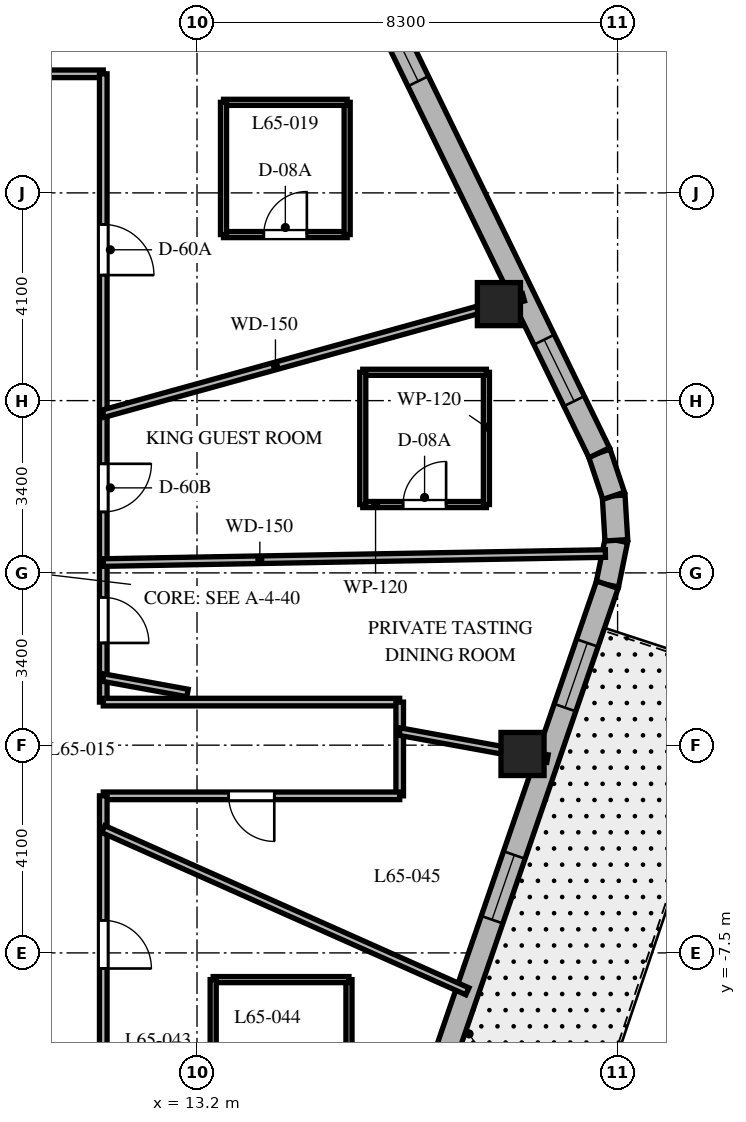
"""IFC4 building model, lengths in metres.
Left out: names, types, materials, properties, quantities, classifications, styles, units other than length and angle.
Written with IfcOpenShell. Run it as: python <this file> out.ifc"""

import sys

from ifc_helpers import new_model, si_unit, direction, frame, frame_2d, origin, origin_2d, place, context, subcontext, project, spatial, rectangle, extrude, element, fill, save


model = new_model("IFC4")
c1 = context("Model", 3, precision=1e-05, world=origin(), true_north=direction((0.0, 1.0)))
c2 = subcontext(c1, "Body", "Model", "MODEL_VIEW")
j1 = project(units=[si_unit("LENGTHUNIT", "METRE"), si_unit("PLANEANGLEUNIT", "RADIAN")], contexts=[c1])
p1 = place(None, origin())
s1 = spatial("IfcSite", under=j1, at=p1, CompositionType="ELEMENT")
p2 = place(p1, origin())
s2 = spatial("IfcBuilding", under=s1, at=p2, CompositionType="ELEMENT")
p3 = place(p2, frame((0.0, 0.0, 261.3)))
s3 = spatial("IfcBuildingStorey", under=s2, at=p3, CompositionType="ELEMENT", Elevation=261.3)
for number, where, z_axis, x_axis in (
    (1, (19.624, -3.574, 0.0), (0.0, 0.0, 1.0), (1.0, 0.0, 0.0)),
    (2, (19.158, 5.305, 0.0), (0.0, 0.0, 1.0), (1.0, 0.0, 0.0)),
):
    element("IfcColumn", number, at=place(p3, frame(where, z_axis=z_axis, x_axis=x_axis)), inside=s3, PredefinedType="COLUMN", context=c2, shape_type="SweptSolid", body=[
        extrude(rectangle(XDim=0.85, YDim=0.85, at=origin_2d()), origin(), (0.0, 0.0, 1.0), 3.9),
    ])
p4 = place(p3, frame((21.298, -0.233, 0.0), z_axis=(0.0, 0.0, 1.0), x_axis=(0.199158176661, 0.979967356941, 0.0)))
e3 = element("IfcWall", 3, at=p4, inside=s3, PredefinedType="SOLIDWALL", context=c2, shape_type="SweptSolid", body=[
    extrude(rectangle(XDim=0.895, YDim=0.45, at=frame_2d((0.447, 0.0))), origin(), (0.0, 0.0, 1.0), 3.6),
])
p5 = place(p3, frame((21.476, 0.644, 0.0), z_axis=(0.0, 0.0, 1.0), x_axis=(-0.061031097918, 0.998135865044, 0.0)))
e4 = element("IfcWall", 4, at=p5, inside=s3, PredefinedType="SOLIDWALL", context=c2, shape_type="SweptSolid", body=[
    extrude(rectangle(XDim=0.88, YDim=0.45, at=frame_2d((0.44, 0.0))), origin(), (0.0, 0.0, 1.0), 3.6),
])
p6 = place(p3, frame((21.422, 1.522, 0.0), z_axis=(0.0, 0.0, 1.0), x_axis=(-0.316964162323, 0.94843751497, 0.0)))
e5 = element("IfcWall", 5, at=p6, inside=s3, PredefinedType="SOLIDWALL", context=c2, shape_type="SweptSolid", body=[
    extrude(rectangle(XDim=0.895, YDim=0.45, at=frame_2d((0.448, 0.0))), origin(), (0.0, 0.0, 1.0), 3.6),
])
p7 = place(p3, frame((15.26, -17.776, 0.0), z_axis=(0.0, 0.0, 1.0), x_axis=(0.325407437101, 0.945573899745, 0.0)))
e6 = element("IfcWall", 6, at=p7, inside=s3, PredefinedType="SOLIDWALL", context=c2, shape_type="SweptSolid", body=[
    extrude(rectangle(XDim=18.552, YDim=0.45, at=frame_2d((9.276, 0.0))), origin(), (0.0, 0.0, 1.0), 3.6),
])
p8 = place(p7, frame((4.602, 0.0, 0.0)))
e7 = element("IfcOpeningElement", 7, at=p8, cuts=e6, PredefinedType="OPENING", context=c2, shape_type="SweptSolid", body=[
    extrude(rectangle(XDim=0.95, YDim=2.15, at=frame_2d((0.475, 1.075))), frame((0.0, 0.235, 0.0), z_axis=(0.0, -1.0, 0.0), x_axis=(1.0, 0.0, 0.0)), (0.0, 0.0, 1.0), 0.47),
])
p9 = place(p7, frame((1.161, 0.0, 0.8)))
e8 = element("IfcOpeningElement", 8, at=p9, cuts=e6, PredefinedType="OPENING", context=c2, shape_type="SweptSolid", body=[
    extrude(rectangle(XDim=1.35, YDim=1.75, at=frame_2d((0.675, 0.875))), frame((0.0, 0.235, 0.0), z_axis=(0.0, -1.0, 0.0), x_axis=(1.0, 0.0, 0.0)), (0.0, 0.0, 1.0), 0.47),
])
p10 = place(p7, frame((6.379, 0.0, 0.8)))
e9 = element("IfcOpeningElement", 9, at=p10, cuts=e6, PredefinedType="OPENING", context=c2, shape_type="SweptSolid", body=[
    extrude(rectangle(XDim=1.35, YDim=1.75, at=frame_2d((0.675, 0.875))), frame((0.0, 0.235, 0.0), z_axis=(0.0, -1.0, 0.0), x_axis=(1.0, 0.0, 0.0)), (0.0, 0.0, 1.0), 0.47),
])
p11 = place(p7, frame((11.561, 0.0, 0.8)))
e10 = element("IfcOpeningElement", 10, at=p11, cuts=e6, PredefinedType="OPENING", context=c2, shape_type="SweptSolid", body=[
    extrude(rectangle(XDim=1.35, YDim=1.75, at=frame_2d((0.675, 0.875))), frame((0.0, 0.235, 0.0), z_axis=(0.0, -1.0, 0.0), x_axis=(1.0, 0.0, 0.0)), (0.0, 0.0, 1.0), 0.47),
])
p12 = place(p7, frame((15.987, 0.0, 0.8)))
e11 = element("IfcOpeningElement", 11, at=p12, cuts=e6, PredefinedType="OPENING", context=c2, shape_type="SweptSolid", body=[
    extrude(rectangle(XDim=1.35, YDim=1.75, at=frame_2d((0.675, 0.875))), frame((0.0, 0.235, 0.0), z_axis=(0.0, -1.0, 0.0), x_axis=(1.0, 0.0, 0.0)), (0.0, 0.0, 1.0), 0.47),
])
p13 = place(p3, frame((21.138, 2.371, 0.0), z_axis=(0.0, 0.0, 1.0), x_axis=(-0.438128124058, 0.89891253574, 0.0)))
e12 = element("IfcWall", 12, at=p13, inside=s3, PredefinedType="SOLIDWALL", context=c2, shape_type="SweptSolid", body=[
    extrude(rectangle(XDim=17.565, YDim=0.45, at=frame_2d((8.782, 0.0))), origin(), (0.0, 0.0, 1.0), 3.6),
])
p14 = place(p13, frame((1.133, 0.0, 0.8)))
e13 = element("IfcOpeningElement", 13, at=p14, cuts=e12, PredefinedType="OPENING", context=c2, shape_type="SweptSolid", body=[
    extrude(rectangle(XDim=1.35, YDim=1.75, at=frame_2d((0.675, 0.875))), frame((0.0, 0.235, 0.0), z_axis=(0.0, -1.0, 0.0), x_axis=(1.0, 0.0, 0.0)), (0.0, 0.0, 1.0), 0.47),
])
p15 = place(p13, frame((8.158, 0.0, 0.8)))
e14 = element("IfcOpeningElement", 14, at=p15, cuts=e12, PredefinedType="OPENING", context=c2, shape_type="SweptSolid", body=[
    extrude(rectangle(XDim=1.35, YDim=1.75, at=frame_2d((0.675, 0.875))), frame((0.0, 0.235, 0.0), z_axis=(0.0, -1.0, 0.0), x_axis=(1.0, 0.0, 0.0)), (0.0, 0.0, 1.0), 0.47),
])
p16 = place(p13, frame((15.132, 0.0, 0.8)))
e15 = element("IfcOpeningElement", 15, at=p16, cuts=e12, PredefinedType="OPENING", context=c2, shape_type="SweptSolid", body=[
    extrude(rectangle(XDim=1.35, YDim=1.75, at=frame_2d((0.675, 0.875))), frame((0.0, 0.235, 0.0), z_axis=(0.0, -1.0, 0.0), x_axis=(1.0, 0.0, 0.0)), (0.0, 0.0, 1.0), 0.47),
])
p17 = place(p3, frame((0.92, 9.85, 0.0), z_axis=(0.0, 0.0, 1.0), x_axis=(1.0, 0.0, 0.0)))
e16 = element("IfcWall", 16, at=p17, inside=s3, PredefinedType="PARTITIONING", context=c2, shape_type="SweptSolid", body=[
    extrude(rectangle(XDim=10.43, YDim=0.15, at=frame_2d((5.215, 0.0))), origin(), (0.0, 0.0, 1.0), 3.09),
])
p18 = place(p17, frame((2.86, 0.0, 0.0)))
e17 = element("IfcOpeningElement", 17, at=p18, cuts=e16, PredefinedType="OPENING", context=c2, shape_type="SweptSolid", body=[
    extrude(rectangle(XDim=0.9, YDim=2.03, at=frame_2d((0.45, 1.015))), frame((0.0, 0.085, 0.0), z_axis=(0.0, -1.0, 0.0), x_axis=(1.0, 0.0, 0.0)), (0.0, 0.0, 1.0), 0.17),
])
p19 = place(p3, frame((11.35, 9.85, 0.0), z_axis=(0.0, 0.0, 1.0), x_axis=(0.0, -1.0, 0.0)))
e18 = element("IfcWall", 18, at=p19, inside=s3, PredefinedType="PARTITIONING", context=c2, shape_type="SweptSolid", body=[
    extrude(rectangle(XDim=12.4, YDim=0.15, at=frame_2d((6.2, 0.0))), origin(), (0.0, 0.0, 1.0), 3.09),
])
p20 = place(p19, frame((7.697, 0.0, 0.0)))
e19 = element("IfcOpeningElement", 19, at=p20, cuts=e18, PredefinedType="OPENING", context=c2, shape_type="SweptSolid", body=[
    extrude(rectangle(XDim=0.95, YDim=2.03, at=frame_2d((0.475, 1.015))), frame((0.0, 0.085, 0.0), z_axis=(0.0, -1.0, 0.0), x_axis=(1.0, 0.0, 0.0)), (0.0, 0.0, 1.0), 0.17),
])
p21 = place(p19, frame((2.973, 0.0, 0.0)))
e20 = element("IfcOpeningElement", 20, at=p21, cuts=e18, PredefinedType="OPENING", context=c2, shape_type="SweptSolid", body=[
    extrude(rectangle(XDim=1.0, YDim=2.03, at=frame_2d((0.5, 1.015))), frame((0.0, 0.085, 0.0), z_axis=(0.0, -1.0, 0.0), x_axis=(1.0, 0.0, 0.0)), (0.0, 0.0, 1.0), 0.17),
])
p22 = place(p19, frame((10.333, 0.0, 0.0)))
e21 = element("IfcOpeningElement", 21, at=p22, cuts=e18, PredefinedType="OPENING", context=c2, shape_type="SweptSolid", body=[
    extrude(rectangle(XDim=0.9, YDim=2.03, at=frame_2d((0.45, 1.015))), frame((0.0, 0.085, 0.0), z_axis=(0.0, -1.0, 0.0), x_axis=(1.0, 0.0, 0.0)), (0.0, 0.0, 1.0), 0.17),
])
p23 = place(p3, frame((11.35, -2.55, 0.0), z_axis=(0.0, 0.0, 1.0), x_axis=(1.0, 0.0, 0.0)))
e22 = element("IfcWall", 22, at=p23, inside=s3, PredefinedType="PARTITIONING", context=c2, shape_type="SweptSolid", body=[
    extrude(rectangle(XDim=5.85, YDim=0.15, at=frame_2d((2.925, 0.0))), origin(), (0.0, 0.0, 1.0), 3.041),
])
p24 = place(p3, frame((17.2, -2.55, 0.0), z_axis=(0.0, 0.0, 1.0), x_axis=(0.0, -1.0, 0.0)))
e23 = element("IfcWall", 23, at=p24, inside=s3, PredefinedType="PARTITIONING", context=c2, shape_type="SweptSolid", body=[
    extrude(rectangle(XDim=1.85, YDim=0.15, at=frame_2d((0.925, 0.0))), origin(), (0.0, 0.0, 1.0), 3.09),
])
p25 = place(p3, frame((17.2, -4.4, 0.0), z_axis=(0.0, 0.0, 1.0), x_axis=(-1.0, 0.0, 0.0)))
e24 = element("IfcWall", 24, at=p25, inside=s3, PredefinedType="PARTITIONING", context=c2, shape_type="SweptSolid", body=[
    extrude(rectangle(XDim=5.85, YDim=0.15, at=frame_2d((2.925, 0.0))), origin(), (0.0, 0.0, 1.0), 3.041),
])
p26 = place(p25, frame((2.475, 0.0, 0.0)))
e25 = element("IfcOpeningElement", 25, at=p26, cuts=e24, PredefinedType="OPENING", context=c2, shape_type="SweptSolid", body=[
    extrude(rectangle(XDim=0.9, YDim=2.03, at=frame_2d((0.45, 1.015))), frame((0.0, 0.085, 0.0), z_axis=(0.0, -1.0, 0.0), x_axis=(1.0, 0.0, 0.0)), (0.0, 0.0, 1.0), 0.17),
])
p27 = place(p3, frame((11.35, -4.4, 0.0), z_axis=(0.0, 0.0, 1.0), x_axis=(0.0, -1.0, 0.0)))
e26 = element("IfcWall", 26, at=p27, inside=s3, PredefinedType="PARTITIONING", context=c2, shape_type="SweptSolid", body=[
    extrude(rectangle(XDim=5.45, YDim=0.15, at=frame_2d((2.725, 0.0))), origin(), (0.0, 0.0, 1.0), 3.09),
])
p28 = place(p27, frame((2.458, 0.0, 0.0)))
e27 = element("IfcOpeningElement", 27, at=p28, cuts=e26, PredefinedType="OPENING", context=c2, shape_type="SweptSolid", body=[
    extrude(rectangle(XDim=0.95, YDim=2.03, at=frame_2d((0.475, 1.015))), frame((0.0, 0.085, 0.0), z_axis=(0.0, -1.0, 0.0), x_axis=(1.0, 0.0, 0.0)), (0.0, 0.0, 1.0), 0.17),
])
p29 = place(p3, frame((11.35, 0.204, 0.0), z_axis=(0.0, 0.0, 1.0), x_axis=(0.999838748671, 0.017957635019, 0.0)))
e28 = element("IfcWall", 28, at=p29, inside=s3, PredefinedType="PARTITIONING", context=c2, shape_type="SweptSolid", body=[
    extrude(rectangle(XDim=9.911, YDim=0.15, at=frame_2d((4.956, 0.0))), origin(), (0.0, 0.0, 1.0), 2.94),
])
p30 = place(p3, frame((11.35, 3.143, 0.0), z_axis=(0.0, 0.0, 1.0), x_axis=(0.963731818141, 0.266872596386, 0.0)))
e29 = element("IfcWall", 29, at=p30, inside=s3, PredefinedType="PARTITIONING", context=c2, shape_type="SweptSolid", body=[
    extrude(rectangle(XDim=8.605, YDim=0.15, at=frame_2d((4.302, 0.0))), origin(), (0.0, 0.0, 1.0), 2.94),
])
p31 = place(p3, frame((9.672, 9.85, 0.0), z_axis=(0.0, 0.0, 1.0), x_axis=(0.700629771301, 0.713524998558, 0.0)))
e30 = element("IfcWall", 30, at=p31, inside=s3, PredefinedType="PARTITIONING", context=c2, shape_type="SweptSolid", body=[
    extrude(rectangle(XDim=7.459, YDim=0.15, at=frame_2d((3.73, 0.0))), origin(), (0.0, 0.0, 1.0), 2.94),
])
p32 = place(p31, frame((3.28, 0.0, 0.0)))
e31 = element("IfcOpeningElement", 31, at=p32, cuts=e30, PredefinedType="OPENING", context=c2, shape_type="SweptSolid", body=[
    extrude(rectangle(XDim=0.9, YDim=2.03, at=frame_2d((0.45, 1.015))), frame((0.0, 0.085, 0.0), z_axis=(0.0, -1.0, 0.0), x_axis=(1.0, 0.0, 0.0)), (0.0, 0.0, 1.0), 0.17),
])
p33 = place(p3, frame((5.454, 9.85, 0.0), z_axis=(0.0, 0.0, 1.0), x_axis=(0.48439420613, 0.874849846012, 0.0)))
e32 = element("IfcWall", 32, at=p33, inside=s3, PredefinedType="PARTITIONING", context=c2, shape_type="SweptSolid", body=[
    extrude(rectangle(XDim=11.375, YDim=0.15, at=frame_2d((5.688, 0.0))), origin(), (0.0, 0.0, 1.0), 2.94),
])
p34 = place(p3, frame((11.35, -5.057, 0.0), z_axis=(0.0, 0.0, 1.0), x_axis=(0.91344644156, -0.406958964026, 0.0)))
e33 = element("IfcWall", 33, at=p34, inside=s3, PredefinedType="PARTITIONING", context=c2, shape_type="SweptSolid", body=[
    extrude(rectangle(XDim=7.867, YDim=0.15, at=frame_2d((3.933, 0.0))), origin(), (0.0, 0.0, 1.0), 2.94),
])
p35 = place(p3, frame((11.35, -2.067, 0.0), z_axis=(0.0, 0.0, 1.0), x_axis=(0.983807459651, -0.179228575665, 0.0)))
e34 = element("IfcWall", 34, at=p35, inside=s3, PredefinedType="PARTITIONING", context=c2, shape_type="SweptSolid", body=[
    extrude(rectangle(XDim=1.69, YDim=0.15, at=frame_2d((0.845, 0.0))), origin(), (0.0, 0.0, 1.0), 3.6),
])
p36 = place(p3, frame((17.2, -3.133, 0.0), z_axis=(0.0, 0.0, 1.0), x_axis=(0.983817168797, -0.179175272791, 0.0)))
e35 = element("IfcWall", 35, at=p36, inside=s3, PredefinedType="PARTITIONING", context=c2, shape_type="SweptSolid", body=[
    extrude(rectangle(XDim=2.965, YDim=0.15, at=frame_2d((1.482, 0.0))), origin(), (0.0, 0.0, 1.0), 2.94),
])
p37 = place(p3, frame((16.471, 1.349, 0.0), z_axis=(0.0, 0.0, 1.0), x_axis=(1.0, 0.0, 0.0)))
e36 = element("IfcWall", 36, at=p37, inside=s3, PredefinedType="PARTITIONING", context=c2, shape_type="SweptSolid", body=[
    extrude(rectangle(XDim=2.44, YDim=0.12, at=frame_2d((1.22, 0.0))), origin(), (0.0, 0.0, 1.0), 3.6),
])
p38 = place(p37, frame((0.795, 0.0, 0.0)))
e37 = element("IfcOpeningElement", 37, at=p38, cuts=e36, PredefinedType="OPENING", context=c2, shape_type="SweptSolid", body=[
    extrude(rectangle(XDim=0.85, YDim=2.03, at=frame_2d((0.425, 1.015))), frame((0.0, 0.07, 0.0), z_axis=(0.0, -1.0, 0.0), x_axis=(1.0, 0.0, 0.0)), (0.0, 0.0, 1.0), 0.14),
])
p39 = place(p3, frame((18.911, 1.349, 0.0), z_axis=(0.0, 0.0, 1.0), x_axis=(0.0, 1.0, 0.0)))
e38 = element("IfcWall", 38, at=p39, inside=s3, PredefinedType="PARTITIONING", context=c2, shape_type="SweptSolid", body=[
    extrude(rectangle(XDim=2.61, YDim=0.12, at=frame_2d((1.305, 0.0))), origin(), (0.0, 0.0, 1.0), 3.6),
])
p40 = place(p3, frame((18.911, 3.959, 0.0), z_axis=(0.0, 0.0, 1.0), x_axis=(-1.0, 0.0, 0.0)))
e39 = element("IfcWall", 39, at=p40, inside=s3, PredefinedType="PARTITIONING", context=c2, shape_type="SweptSolid", body=[
    extrude(rectangle(XDim=2.44, YDim=0.12, at=frame_2d((1.22, 0.0))), origin(), (0.0, 0.0, 1.0), 3.6),
])
p41 = place(p3, frame((16.471, 3.959, 0.0), z_axis=(0.0, 0.0, 1.0), x_axis=(0.0, -1.0, 0.0)))
e40 = element("IfcWall", 40, at=p41, inside=s3, PredefinedType="PARTITIONING", context=c2, shape_type="SweptSolid", body=[
    extrude(rectangle(XDim=2.61, YDim=0.12, at=frame_2d((1.305, 0.0))), origin(), (0.0, 0.0, 1.0), 3.6),
])
p42 = place(p3, frame((13.723, 6.677, 0.0), z_axis=(0.0, 0.0, 1.0), x_axis=(1.0, 0.0, 0.0)))
e41 = element("IfcWall", 41, at=p42, inside=s3, PredefinedType="PARTITIONING", context=c2, shape_type="SweptSolid", body=[
    extrude(rectangle(XDim=2.44, YDim=0.12, at=frame_2d((1.22, 0.0))), origin(), (0.0, 0.0, 1.0), 3.126),
])
p43 = place(p42, frame((0.795, 0.0, 0.0)))
e42 = element("IfcOpeningElement", 42, at=p43, cuts=e41, PredefinedType="OPENING", context=c2, shape_type="SweptSolid", body=[
    extrude(rectangle(XDim=0.85, YDim=2.03, at=frame_2d((0.425, 1.015))), frame((0.0, 0.07, 0.0), z_axis=(0.0, -1.0, 0.0), x_axis=(1.0, 0.0, 0.0)), (0.0, 0.0, 1.0), 0.14),
])
p44 = place(p3, frame((16.163, 6.677, 0.0), z_axis=(0.0, 0.0, 1.0), x_axis=(0.0, 1.0, 0.0)))
e43 = element("IfcWall", 43, at=p44, inside=s3, PredefinedType="PARTITIONING", context=c2, shape_type="SweptSolid", body=[
    extrude(rectangle(XDim=2.61, YDim=0.12, at=frame_2d((1.305, 0.0))), origin(), (0.0, 0.0, 1.0), 3.6),
])
p45 = place(p3, frame((16.163, 9.287, 0.0), z_axis=(0.0, 0.0, 1.0), x_axis=(-1.0, 0.0, 0.0)))
e44 = element("IfcWall", 44, at=p45, inside=s3, PredefinedType="PARTITIONING", context=c2, shape_type="SweptSolid", body=[
    extrude(rectangle(XDim=2.44, YDim=0.12, at=frame_2d((1.22, 0.0))), origin(), (0.0, 0.0, 1.0), 3.126),
])
p46 = place(p3, frame((13.723, 9.287, 0.0), z_axis=(0.0, 0.0, 1.0), x_axis=(0.0, -1.0, 0.0)))
e45 = element("IfcWall", 45, at=p46, inside=s3, PredefinedType="PARTITIONING", context=c2, shape_type="SweptSolid", body=[
    extrude(rectangle(XDim=2.61, YDim=0.12, at=frame_2d((1.305, 0.0))), origin(), (0.0, 0.0, 1.0), 3.6),
])
p47 = place(p3, frame((16.199, -10.567, 0.0), z_axis=(0.0, 0.0, 1.0), x_axis=(0.0, 1.0, 0.0)))
e46 = element("IfcWall", 46, at=p47, inside=s3, PredefinedType="PARTITIONING", context=c2, shape_type="SweptSolid", body=[
    extrude(rectangle(XDim=2.54, YDim=0.12, at=frame_2d((1.27, 0.0))), origin(), (0.0, 0.0, 1.0), 3.6),
])
p48 = place(p3, frame((16.199, -8.027, 0.0), z_axis=(0.0, 0.0, 1.0), x_axis=(-1.0, 0.0, 0.0)))
e47 = element("IfcWall", 47, at=p48, inside=s3, PredefinedType="PARTITIONING", context=c2, shape_type="SweptSolid", body=[
    extrude(rectangle(XDim=2.68, YDim=0.12, at=frame_2d((1.34, 0.0))), origin(), (0.0, 0.0, 1.0), 3.172),
])
p49 = place(p3, frame((13.519, -8.027, 0.0), z_axis=(0.0, 0.0, 1.0), x_axis=(0.0, -1.0, 0.0)))
e48 = element("IfcWall", 48, at=p49, inside=s3, PredefinedType="PARTITIONING", context=c2, shape_type="SweptSolid", body=[
    extrude(rectangle(XDim=2.54, YDim=0.12, at=frame_2d((1.27, 0.0))), origin(), (0.0, 0.0, 1.0), 3.6),
])
p50 = place(p11, origin())
e49 = element("IfcWindow", 49, at=p50, inside=s3, PartitioningType="SINGLE_PANEL", PredefinedType="WINDOW", context=c2, shape_type="SweptSolid", body=[
    extrude(rectangle(XDim=1.35, YDim=1.75, at=frame_2d((0.675, 0.875))), frame((0.0, 0.03, 0.0), z_axis=(0.0, -1.0, 0.0), x_axis=(1.0, 0.0, 0.0)), (0.0, 0.0, 1.0), 0.06),
])
fill(e10, e49)
p51 = place(p12, origin())
e50 = element("IfcWindow", 50, at=p51, inside=s3, PartitioningType="SINGLE_PANEL", PredefinedType="WINDOW", context=c2, shape_type="SweptSolid", body=[
    extrude(rectangle(XDim=1.35, YDim=1.75, at=frame_2d((0.675, 0.875))), frame((0.0, 0.03, 0.0), z_axis=(0.0, -1.0, 0.0), x_axis=(1.0, 0.0, 0.0)), (0.0, 0.0, 1.0), 0.06),
])
fill(e11, e50)
p52 = place(p14, origin())
e51 = element("IfcWindow", 51, at=p52, inside=s3, PartitioningType="SINGLE_PANEL", PredefinedType="WINDOW", context=c2, shape_type="SweptSolid", body=[
    extrude(rectangle(XDim=1.35, YDim=1.75, at=frame_2d((0.675, 0.875))), frame((0.0, 0.03, 0.0), z_axis=(0.0, -1.0, 0.0), x_axis=(1.0, 0.0, 0.0)), (0.0, 0.0, 1.0), 0.06),
])
fill(e13, e51)
p53 = place(p15, origin())
e52 = element("IfcWindow", 52, at=p53, inside=s3, PartitioningType="SINGLE_PANEL", PredefinedType="WINDOW", context=c2, shape_type="SweptSolid", body=[
    extrude(rectangle(XDim=1.35, YDim=1.75, at=frame_2d((0.675, 0.875))), frame((0.0, 0.03, 0.0), z_axis=(0.0, -1.0, 0.0), x_axis=(1.0, 0.0, 0.0)), (0.0, 0.0, 1.0), 0.06),
])
fill(e14, e52)
p54 = place(p20, origin())
e53 = element("IfcDoor", 53, at=p54, inside=s3, OperationType="SINGLE_SWING_LEFT", PredefinedType="DOOR", context=c2, shape_type="SweptSolid", body=[
    extrude(rectangle(XDim=0.95, YDim=2.03, at=frame_2d((0.475, 1.015))), frame((0.0, 0.025, 0.0), z_axis=(0.0, -1.0, 0.0), x_axis=(1.0, 0.0, 0.0)), (0.0, 0.0, 1.0), 0.05),
])
fill(e19, e53)
p55 = place(p38, origin())
e54 = element("IfcDoor", 54, at=p55, inside=s3, OperationType="SINGLE_SWING_RIGHT", PredefinedType="DOOR", context=c2, shape_type="SweptSolid", body=[
    extrude(rectangle(XDim=0.85, YDim=2.03, at=frame_2d((0.425, 1.015))), frame((0.0, 0.025, 0.0), z_axis=(0.0, -1.0, 0.0), x_axis=(1.0, 0.0, 0.0)), (0.0, 0.0, 1.0), 0.05),
])
fill(e37, e54)
p56 = place(p21, origin())
e55 = element("IfcDoor", 55, at=p56, inside=s3, OperationType="SINGLE_SWING_RIGHT", PredefinedType="DOOR", context=c2, shape_type="SweptSolid", body=[
    extrude(rectangle(XDim=1.0, YDim=2.03, at=frame_2d((0.5, 1.015))), frame((0.0, 0.025, 0.0), z_axis=(0.0, -1.0, 0.0), x_axis=(1.0, 0.0, 0.0)), (0.0, 0.0, 1.0), 0.05),
])
fill(e20, e55)
p57 = place(p43, origin())
e56 = element("IfcDoor", 56, at=p57, inside=s3, OperationType="SINGLE_SWING_RIGHT", PredefinedType="DOOR", context=c2, shape_type="SweptSolid", body=[
    extrude(rectangle(XDim=0.85, YDim=2.03, at=frame_2d((0.425, 1.015))), frame((0.0, 0.025, 0.0), z_axis=(0.0, -1.0, 0.0), x_axis=(1.0, 0.0, 0.0)), (0.0, 0.0, 1.0), 0.05),
])
fill(e42, e56)
p58 = place(p28, origin())
e57 = element("IfcDoor", 57, at=p58, inside=s3, OperationType="SINGLE_SWING_RIGHT", PredefinedType="DOOR", context=c2, shape_type="SweptSolid", body=[
    extrude(rectangle(XDim=0.95, YDim=2.03, at=frame_2d((0.475, 1.015))), frame((0.0, 0.025, 0.0), z_axis=(0.0, -1.0, 0.0), x_axis=(1.0, 0.0, 0.0)), (0.0, 0.0, 1.0), 0.05),
])
fill(e27, e57)
p59 = place(p26, origin())
e58 = element("IfcDoor", 58, at=p59, inside=s3, OperationType="SINGLE_SWING_LEFT", PredefinedType="DOOR", context=c2, shape_type="SweptSolid", body=[
    extrude(rectangle(XDim=0.9, YDim=2.03, at=frame_2d((0.45, 1.015))), frame((0.0, 0.025, 0.0), z_axis=(0.0, -1.0, 0.0), x_axis=(1.0, 0.0, 0.0)), (0.0, 0.0, 1.0), 0.05),
])
fill(e25, e58)
p60 = place(p22, origin())
e59 = element("IfcDoor", 59, at=p60, inside=s3, OperationType="SINGLE_SWING_RIGHT", PredefinedType="DOOR", context=c2, shape_type="SweptSolid", body=[
    extrude(rectangle(XDim=0.9, YDim=2.03, at=frame_2d((0.45, 1.015))), frame((0.0, 0.025, 0.0), z_axis=(0.0, -1.0, 0.0), x_axis=(1.0, 0.0, 0.0)), (0.0, 0.0, 1.0), 0.05),
])
fill(e21, e59)
save(model, sys.argv[1])
